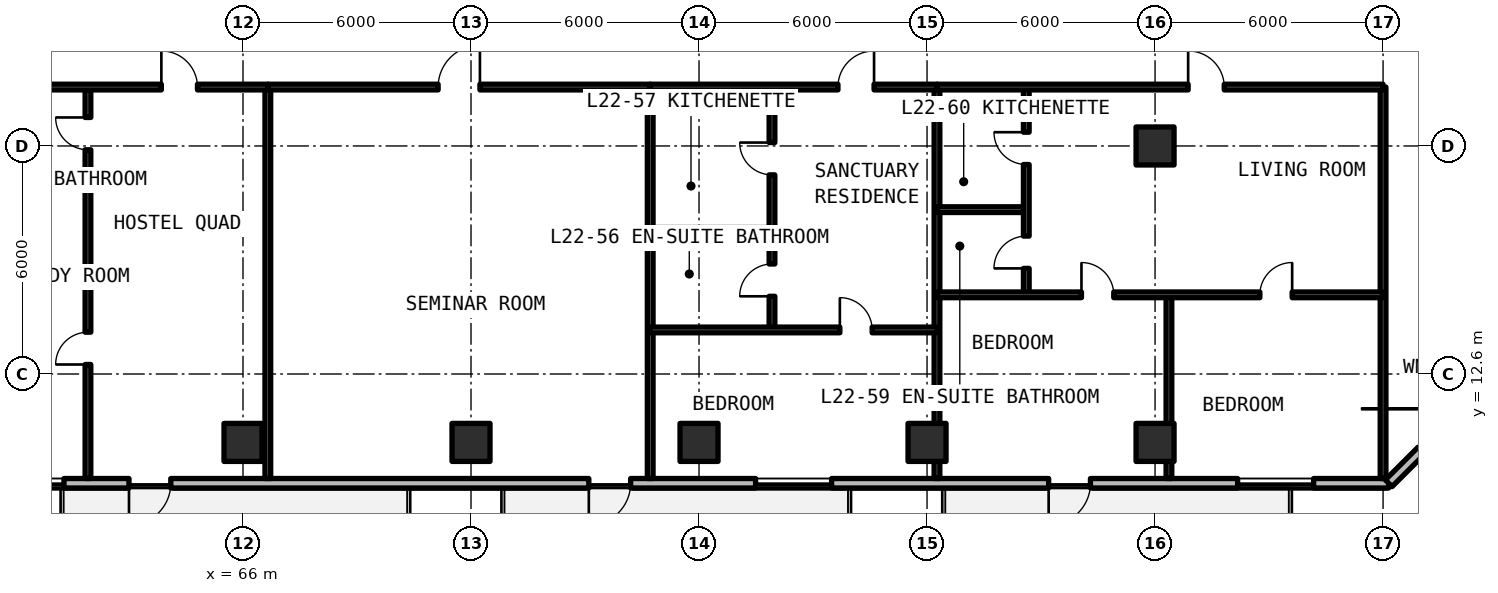
"""IFC4 building model, lengths in metres.
Left out: names, types, materials, properties, quantities, classifications, styles, units other than length and angle.
Written with IfcOpenShell. Run it as: python <this file> out.ifc"""

import sys

from ifc_helpers import new_model, si_unit, direction, frame, frame_2d, origin, origin_2d, place, context, subcontext, project, spatial, rectangle, extrude, element, fill, save


model = new_model("IFC4")
c1 = context("Model", 3, precision=1e-05, world=origin(), true_north=direction((0.0, 1.0)))
c2 = subcontext(c1, "Body", "Model", "MODEL_VIEW")
j1 = project(units=[si_unit("LENGTHUNIT", "METRE"), si_unit("PLANEANGLEUNIT", "RADIAN")], contexts=[c1])
p1 = place(None, origin())
s1 = spatial("IfcSite", under=j1, at=p1, CompositionType="ELEMENT")
p2 = place(p1, origin())
s2 = spatial("IfcBuilding", under=s1, at=p2, CompositionType="ELEMENT")
p3 = place(p2, frame((0.0, 0.0, 82.17)))
s3 = spatial("IfcBuildingStorey", under=s2, at=p3, CompositionType="ELEMENT", Elevation=82.17)
for number, where, z_axis, x_axis in (
    (1, (90.0, 18.6, 0.0), (0.0, 0.0, 1.0), (1.0, 0.0, 0.0)),
    (2, (66.0, 10.8, 0.0), (0.0, 0.0, 1.0), (1.0, 0.0, 0.0)),
    (3, (72.0, 10.8, 0.0), (0.0, 0.0, 1.0), (1.0, 0.0, 0.0)),
    (4, (78.0, 10.8, 0.0), (0.0, 0.0, 1.0), (1.0, 0.0, 0.0)),
    (5, (84.0, 10.8, 0.0), (0.0, 0.0, 1.0), (1.0, 0.0, 0.0)),
    (6, (90.0, 10.8, 0.0), (0.0, 0.0, 1.0), (1.0, 0.0, 0.0)),
):
    element("IfcColumn", number, at=place(p3, frame(where, z_axis=z_axis, x_axis=x_axis)), inside=s3, PredefinedType="COLUMN", context=c2, shape_type="SweptSolid", body=[
        extrude(rectangle(XDim=1.0, YDim=1.0, at=origin_2d()), origin(), (0.0, 0.0, 1.0), 3.3),
    ])
p4 = place(p3, frame((52.125, 9.725, 0.0), z_axis=(0.0, 0.0, 1.0), x_axis=(1.0, 0.0, 0.0)))
e7 = element("IfcWall", 7, at=p4, inside=s3, PredefinedType="SOLIDWALL", context=c2, shape_type="SweptSolid", body=[
    extrude(rectangle(XDim=44.023, YDim=0.25, at=frame_2d((22.012, 0.0))), origin(), (0.0, 0.0, 1.0), 3.08),
])
p5 = place(p4, frame((10.875, 0.0, 0.0)))
e8 = element("IfcOpeningElement", 8, at=p5, cuts=e7, PredefinedType="OPENING", context=c2, shape_type="SweptSolid", body=[
    extrude(rectangle(XDim=1.1, YDim=2.15, at=frame_2d((0.55, 1.075))), frame((0.0, 0.135, 0.0), z_axis=(0.0, -1.0, 0.0), x_axis=(1.0, 0.0, 0.0)), (0.0, 0.0, 1.0), 0.27),
])
p6 = place(p4, frame((22.975, 0.0, 0.0)))
e9 = element("IfcOpeningElement", 9, at=p6, cuts=e7, PredefinedType="OPENING", context=c2, shape_type="SweptSolid", body=[
    extrude(rectangle(XDim=1.1, YDim=2.15, at=frame_2d((0.55, 1.075))), frame((0.0, 0.135, 0.0), z_axis=(0.0, -1.0, 0.0), x_axis=(1.0, 0.0, 0.0)), (0.0, 0.0, 1.0), 0.27),
])
p7 = place(p4, frame((35.075, 0.0, 0.0)))
e10 = element("IfcOpeningElement", 10, at=p7, cuts=e7, PredefinedType="OPENING", context=c2, shape_type="SweptSolid", body=[
    extrude(rectangle(XDim=1.1, YDim=2.15, at=frame_2d((0.55, 1.075))), frame((0.0, 0.135, 0.0), z_axis=(0.0, -1.0, 0.0), x_axis=(1.0, 0.0, 0.0)), (0.0, 0.0, 1.0), 0.27),
])
p8 = place(p4, frame((2.669, 0.0, 0.78)))
e11 = element("IfcOpeningElement", 11, at=p8, cuts=e7, PredefinedType="OPENING", context=c2, shape_type="SweptSolid", body=[
    extrude(rectangle(XDim=2.0, YDim=1.66, at=frame_2d((1.0, 0.83))), frame((0.0, 0.135, 0.0), z_axis=(0.0, -1.0, 0.0), x_axis=(1.0, 0.0, 0.0)), (0.0, 0.0, 1.0), 0.27),
])
p9 = place(p4, frame((8.314, 0.0, 0.78)))
e12 = element("IfcOpeningElement", 12, at=p9, cuts=e7, PredefinedType="OPENING", context=c2, shape_type="SweptSolid", body=[
    extrude(rectangle(XDim=0.85, YDim=1.65, at=frame_2d((0.425, 0.825))), frame((0.0, 0.135, 0.0), z_axis=(0.0, -1.0, 0.0), x_axis=(1.0, 0.0, 0.0)), (0.0, 0.0, 1.0), 0.27),
])
p10 = place(p4, frame((27.363, 0.0, 0.78)))
e13 = element("IfcOpeningElement", 13, at=p10, cuts=e7, PredefinedType="OPENING", context=c2, shape_type="SweptSolid", body=[
    extrude(rectangle(XDim=2.0, YDim=1.66, at=frame_2d((1.0, 0.83))), frame((0.0, 0.135, 0.0), z_axis=(0.0, -1.0, 0.0), x_axis=(1.0, 0.0, 0.0)), (0.0, 0.0, 1.0), 0.27),
])
p11 = place(p4, frame((40.048, 0.0, 0.78)))
e14 = element("IfcOpeningElement", 14, at=p11, cuts=e7, PredefinedType="OPENING", context=c2, shape_type="SweptSolid", body=[
    extrude(rectangle(XDim=2.0, YDim=1.66, at=frame_2d((1.0, 0.83))), frame((0.0, 0.135, 0.0), z_axis=(0.0, -1.0, 0.0), x_axis=(1.0, 0.0, 0.0)), (0.0, 0.0, 1.0), 0.27),
])
p12 = place(p3, frame((96.148, 9.725, 0.0), z_axis=(0.0, 0.0, 1.0), x_axis=(0.707106781187, 0.707106781187, 0.0)))
e15 = element("IfcWall", 15, at=p12, inside=s3, PredefinedType="SOLIDWALL", context=c2, shape_type="SweptSolid", body=[
    extrude(rectangle(XDim=5.836, YDim=0.25, at=frame_2d((2.918, 0.0))), origin(), (0.0, 0.0, 1.0), 3.08),
])
p13 = place(p12, frame((1.218, 0.0, 0.78)))
e16 = element("IfcOpeningElement", 16, at=p13, cuts=e15, PredefinedType="OPENING", context=c2, shape_type="SweptSolid", body=[
    extrude(rectangle(XDim=3.4, YDim=1.66, at=frame_2d((1.7, 0.83))), frame((0.0, 0.135, 0.0), z_axis=(0.0, -1.0, 0.0), x_axis=(1.0, 0.0, 0.0)), (0.0, 0.0, 1.0), 0.27),
])
for number, where, z_axis, x_axis in (
    (17, (96.0, 9.85, 0.0), (0.0, 0.0, 1.0), (0.0, 1.0, 0.0)),
    (18, (66.654, 9.85, 0.0), (0.0, 0.0, 1.0), (0.0, 1.0, 0.0)),
):
    element("IfcWall", number, at=place(p3, frame(where, z_axis=z_axis, x_axis=x_axis)), inside=s3, PredefinedType="SOLIDWALL", context=c2, shape_type="SweptSolid", body=[
        extrude(rectangle(XDim=10.3, YDim=0.15, at=frame_2d((5.15, 0.0))), origin(), (0.0, 0.0, 1.0), 2.35),
    ])
p14 = place(p3, frame((58.828, 17.7, 0.0), z_axis=(0.0, 0.0, 1.0), x_axis=(1.0, 0.0, 0.0)))
e19 = element("IfcWall", 19, at=p14, inside=s3, PredefinedType="PARTITIONING", context=c2, shape_type="SweptSolid", body=[
    extrude(rectangle(XDim=3.092, YDim=0.15, at=frame_2d((1.546, 0.0))), origin(), (0.0, 0.0, 1.0), 2.35),
])
p15 = place(p3, frame((61.92, 9.85, 0.0), z_axis=(0.0, 0.0, 1.0), x_axis=(0.0, 1.0, 0.0)))
e20 = element("IfcWall", 20, at=p15, inside=s3, PredefinedType="PARTITIONING", context=c2, shape_type="SweptSolid", body=[
    extrude(rectangle(XDim=10.3, YDim=0.15, at=frame_2d((5.15, 0.0))), origin(), (0.0, 0.0, 1.0), 2.35),
])
p16 = place(p15, frame((3.0, 0.0, 0.0)))
e21 = element("IfcOpeningElement", 21, at=p16, cuts=e20, PredefinedType="OPENING", context=c2, shape_type="SweptSolid", body=[
    extrude(rectangle(XDim=0.85, YDim=2.1, at=frame_2d((0.425, 1.05))), frame((0.0, 0.085, 0.0), z_axis=(0.0, -1.0, 0.0), x_axis=(1.0, 0.0, 0.0)), (0.0, 0.0, 1.0), 0.17),
])
p17 = place(p15, frame((8.65, 0.0, 0.0)))
e22 = element("IfcOpeningElement", 22, at=p17, cuts=e20, PredefinedType="OPENING", context=c2, shape_type="SweptSolid", body=[
    extrude(rectangle(XDim=0.85, YDim=2.1, at=frame_2d((0.425, 1.05))), frame((0.0, 0.085, 0.0), z_axis=(0.0, -1.0, 0.0), x_axis=(1.0, 0.0, 0.0)), (0.0, 0.0, 1.0), 0.17),
])
p18 = place(p3, frame((58.828, 20.15, 0.0), z_axis=(0.0, 0.0, 1.0), x_axis=(1.0, 0.0, 0.0)))
e23 = element("IfcWall", 23, at=p18, inside=s3, PredefinedType="SOLIDWALL", context=c2, shape_type="SweptSolid", body=[
    extrude(rectangle(XDim=7.826, YDim=0.15, at=frame_2d((3.913, 0.0))), origin(), (0.0, 0.0, 1.0), 2.35),
])
p19 = place(p18, frame((5.024, 0.0, 0.0)))
e24 = element("IfcOpeningElement", 24, at=p19, cuts=e23, PredefinedType="OPENING", context=c2, shape_type="SweptSolid", body=[
    extrude(rectangle(XDim=0.95, YDim=2.15, at=frame_2d((0.475, 1.075))), frame((0.0, 0.085, 0.0), z_axis=(0.0, -1.0, 0.0), x_axis=(1.0, 0.0, 0.0)), (0.0, 0.0, 1.0), 0.17),
])
p20 = place(p3, frame((76.715, 9.85, 0.0), z_axis=(0.0, 0.0, 1.0), x_axis=(0.0, 1.0, 0.0)))
e25 = element("IfcWall", 25, at=p20, inside=s3, PredefinedType="SOLIDWALL", context=c2, shape_type="SweptSolid", body=[
    extrude(rectangle(XDim=10.3, YDim=0.15, at=frame_2d((5.15, 0.0))), origin(), (0.0, 0.0, 1.0), 2.35),
])
p21 = place(p3, frame((66.654, 20.15, 0.0), z_axis=(0.0, 0.0, 1.0), x_axis=(1.0, 0.0, 0.0)))
e26 = element("IfcWall", 26, at=p21, inside=s3, PredefinedType="SOLIDWALL", context=c2, shape_type="SweptSolid", body=[
    extrude(rectangle(XDim=10.062, YDim=0.15, at=frame_2d((5.031, 0.0))), origin(), (0.0, 0.0, 1.0), 2.35),
])
p22 = place(p21, frame((4.481, 0.0, 0.0)))
e27 = element("IfcOpeningElement", 27, at=p22, cuts=e26, PredefinedType="OPENING", context=c2, shape_type="SweptSolid", body=[
    extrude(rectangle(XDim=1.1, YDim=2.15, at=frame_2d((0.55, 1.075))), frame((0.0, 0.085, 0.0), z_axis=(0.0, -1.0, 0.0), x_axis=(1.0, 0.0, 0.0)), (0.0, 0.0, 1.0), 0.17),
])
p23 = place(p3, frame((84.261, 9.85, 0.0), z_axis=(0.0, 0.0, 1.0), x_axis=(0.0, 1.0, 0.0)))
e28 = element("IfcWall", 28, at=p23, inside=s3, PredefinedType="SOLIDWALL", context=c2, shape_type="SweptSolid", body=[
    extrude(rectangle(XDim=10.3, YDim=0.15, at=frame_2d((5.15, 0.0))), origin(), (0.0, 0.0, 1.0), 2.35),
])
p24 = place(p3, frame((76.715, 16.379, 0.0), z_axis=(0.0, 0.0, 1.0), x_axis=(1.0, 0.0, 0.0)))
e29 = element("IfcWall", 29, at=p24, inside=s3, PredefinedType="PARTITIONING", context=c2, shape_type="SweptSolid", body=[
    extrude(rectangle(XDim=3.205, YDim=0.15, at=frame_2d((1.603, 0.0))), origin(), (0.0, 0.0, 1.0), 2.35),
])
p25 = place(p3, frame((79.92, 13.759, 0.0), z_axis=(0.0, 0.0, 1.0), x_axis=(0.0, 1.0, 0.0)))
e30 = element("IfcWall", 30, at=p25, inside=s3, PredefinedType="PARTITIONING", context=c2, shape_type="SweptSolid", body=[
    extrude(rectangle(XDim=6.391, YDim=0.15, at=frame_2d((3.195, 0.0))), origin(), (0.0, 0.0, 1.0), 2.35),
])
p26 = place(p25, frame((0.885, 0.0, 0.0)))
e31 = element("IfcOpeningElement", 31, at=p26, cuts=e30, PredefinedType="OPENING", context=c2, shape_type="SweptSolid", body=[
    extrude(rectangle(XDim=0.85, YDim=2.1, at=frame_2d((0.425, 1.05))), frame((0.0, 0.085, 0.0), z_axis=(0.0, -1.0, 0.0), x_axis=(1.0, 0.0, 0.0)), (0.0, 0.0, 1.0), 0.17),
])
p27 = place(p25, frame((4.08, 0.0, 0.0)))
e32 = element("IfcOpeningElement", 32, at=p27, cuts=e30, PredefinedType="OPENING", context=c2, shape_type="SweptSolid", body=[
    extrude(rectangle(XDim=0.85, YDim=2.1, at=frame_2d((0.425, 1.05))), frame((0.0, 0.085, 0.0), z_axis=(0.0, -1.0, 0.0), x_axis=(1.0, 0.0, 0.0)), (0.0, 0.0, 1.0), 0.17),
])
p28 = place(p3, frame((76.715, 13.759, 0.0), z_axis=(0.0, 0.0, 1.0), x_axis=(1.0, 0.0, 0.0)))
e33 = element("IfcWall", 33, at=p28, inside=s3, PredefinedType="PARTITIONING", context=c2, shape_type="SweptSolid", body=[
    extrude(rectangle(XDim=7.546, YDim=0.15, at=frame_2d((3.773, 0.0))), origin(), (0.0, 0.0, 1.0), 2.35),
])
p29 = place(p28, frame((4.99, 0.0, 0.0)))
e34 = element("IfcOpeningElement", 34, at=p29, cuts=e33, PredefinedType="OPENING", context=c2, shape_type="SweptSolid", body=[
    extrude(rectangle(XDim=0.85, YDim=2.1, at=frame_2d((0.425, 1.05))), frame((0.0, 0.085, 0.0), z_axis=(0.0, -1.0, 0.0), x_axis=(1.0, 0.0, 0.0)), (0.0, 0.0, 1.0), 0.17),
])
p30 = place(p3, frame((76.715, 20.15, 0.0), z_axis=(0.0, 0.0, 1.0), x_axis=(1.0, 0.0, 0.0)))
e35 = element("IfcWall", 35, at=p30, inside=s3, PredefinedType="SOLIDWALL", context=c2, shape_type="SweptSolid", body=[
    extrude(rectangle(XDim=7.546, YDim=0.15, at=frame_2d((3.773, 0.0))), origin(), (0.0, 0.0, 1.0), 2.35),
])
p31 = place(p30, frame((4.94, 0.0, 0.0)))
e36 = element("IfcOpeningElement", 36, at=p31, cuts=e35, PredefinedType="OPENING", context=c2, shape_type="SweptSolid", body=[
    extrude(rectangle(XDim=0.95, YDim=2.15, at=frame_2d((0.475, 1.075))), frame((0.0, 0.085, 0.0), z_axis=(0.0, -1.0, 0.0), x_axis=(1.0, 0.0, 0.0)), (0.0, 0.0, 1.0), 0.17),
])
p32 = place(p3, frame((84.261, 16.924, 0.0), z_axis=(0.0, 0.0, 1.0), x_axis=(1.0, 0.0, 0.0)))
e37 = element("IfcWall", 37, at=p32, inside=s3, PredefinedType="PARTITIONING", context=c2, shape_type="SweptSolid", body=[
    extrude(rectangle(XDim=2.35, YDim=0.15, at=frame_2d((1.175, 0.0))), origin(), (0.0, 0.0, 1.0), 2.35),
])
p33 = place(p3, frame((86.611, 14.683, 0.0), z_axis=(0.0, 0.0, 1.0), x_axis=(0.0, 1.0, 0.0)))
e38 = element("IfcWall", 38, at=p33, inside=s3, PredefinedType="PARTITIONING", context=c2, shape_type="SweptSolid", body=[
    extrude(rectangle(XDim=5.467, YDim=0.15, at=frame_2d((2.733, 0.0))), origin(), (0.0, 0.0, 1.0), 2.35),
])
p34 = place(p33, frame((0.696, 0.0, 0.0)))
e39 = element("IfcOpeningElement", 39, at=p34, cuts=e38, PredefinedType="OPENING", context=c2, shape_type="SweptSolid", body=[
    extrude(rectangle(XDim=0.85, YDim=2.1, at=frame_2d((0.425, 1.05))), frame((0.0, 0.085, 0.0), z_axis=(0.0, -1.0, 0.0), x_axis=(1.0, 0.0, 0.0)), (0.0, 0.0, 1.0), 0.17),
])
p35 = place(p33, frame((3.429, 0.0, 0.0)))
e40 = element("IfcOpeningElement", 40, at=p35, cuts=e38, PredefinedType="OPENING", context=c2, shape_type="SweptSolid", body=[
    extrude(rectangle(XDim=0.85, YDim=2.1, at=frame_2d((0.425, 1.05))), frame((0.0, 0.085, 0.0), z_axis=(0.0, -1.0, 0.0), x_axis=(1.0, 0.0, 0.0)), (0.0, 0.0, 1.0), 0.17),
])
p36 = place(p3, frame((90.365, 9.85, 0.0), z_axis=(0.0, 0.0, 1.0), x_axis=(0.0, 1.0, 0.0)))
e41 = element("IfcWall", 41, at=p36, inside=s3, PredefinedType="PARTITIONING", context=c2, shape_type="SweptSolid", body=[
    extrude(rectangle(XDim=4.833, YDim=0.15, at=frame_2d((2.417, 0.0))), origin(), (0.0, 0.0, 1.0), 2.35),
])
p37 = place(p3, frame((84.261, 14.683, 0.0), z_axis=(0.0, 0.0, 1.0), x_axis=(1.0, 0.0, 0.0)))
e42 = element("IfcWall", 42, at=p37, inside=s3, PredefinedType="PARTITIONING", context=c2, shape_type="SweptSolid", body=[
    extrude(rectangle(XDim=11.739, YDim=0.15, at=frame_2d((5.869, 0.0))), origin(), (0.0, 0.0, 1.0), 2.35),
])
p38 = place(p37, frame((3.802, 0.0, 0.0)))
e43 = element("IfcOpeningElement", 43, at=p38, cuts=e42, PredefinedType="OPENING", context=c2, shape_type="SweptSolid", body=[
    extrude(rectangle(XDim=0.85, YDim=2.1, at=frame_2d((0.425, 1.05))), frame((0.0, 0.085, 0.0), z_axis=(0.0, -1.0, 0.0), x_axis=(1.0, 0.0, 0.0)), (0.0, 0.0, 1.0), 0.17),
])
p39 = place(p37, frame((8.496, 0.0, 0.0)))
e44 = element("IfcOpeningElement", 44, at=p39, cuts=e42, PredefinedType="OPENING", context=c2, shape_type="SweptSolid", body=[
    extrude(rectangle(XDim=0.85, YDim=2.1, at=frame_2d((0.425, 1.05))), frame((0.0, 0.085, 0.0), z_axis=(0.0, -1.0, 0.0), x_axis=(1.0, 0.0, 0.0)), (0.0, 0.0, 1.0), 0.17),
])
p40 = place(p3, frame((84.261, 20.15, 0.0), z_axis=(0.0, 0.0, 1.0), x_axis=(1.0, 0.0, 0.0)))
e45 = element("IfcWall", 45, at=p40, inside=s3, PredefinedType="SOLIDWALL", context=c2, shape_type="SweptSolid", body=[
    extrude(rectangle(XDim=11.739, YDim=0.15, at=frame_2d((5.869, 0.0))), origin(), (0.0, 0.0, 1.0), 2.35),
])
p41 = place(p40, frame((6.609, 0.0, 0.0)))
e46 = element("IfcOpeningElement", 46, at=p41, cuts=e45, PredefinedType="OPENING", context=c2, shape_type="SweptSolid", body=[
    extrude(rectangle(XDim=0.95, YDim=2.15, at=frame_2d((0.475, 1.075))), frame((0.0, 0.085, 0.0), z_axis=(0.0, -1.0, 0.0), x_axis=(1.0, 0.0, 0.0)), (0.0, 0.0, 1.0), 0.17),
])
p42 = place(p5, frame((1.1, 0.0, 0.0), z_axis=(0.0, 0.0, 1.0), x_axis=(-1.0, 0.0, 0.0)))
e47 = element("IfcDoor", 47, at=p42, inside=s3, OperationType="SINGLE_SWING_LEFT", PredefinedType="DOOR", context=c2, shape_type="SweptSolid", body=[
    extrude(rectangle(XDim=1.1, YDim=2.15, at=frame_2d((0.55, 1.075))), frame((0.0, 0.025, 0.0), z_axis=(0.0, -1.0, 0.0), x_axis=(1.0, 0.0, 0.0)), (0.0, 0.0, 1.0), 0.05),
])
fill(e8, e47)
p43 = place(p6, frame((1.1, 0.0, 0.0), z_axis=(0.0, 0.0, 1.0), x_axis=(-1.0, 0.0, 0.0)))
e48 = element("IfcDoor", 48, at=p43, inside=s3, OperationType="SINGLE_SWING_RIGHT", PredefinedType="DOOR", context=c2, shape_type="SweptSolid", body=[
    extrude(rectangle(XDim=1.1, YDim=2.15, at=frame_2d((0.55, 1.075))), frame((0.0, 0.025, 0.0), z_axis=(0.0, -1.0, 0.0), x_axis=(1.0, 0.0, 0.0)), (0.0, 0.0, 1.0), 0.05),
])
fill(e9, e48)
p44 = place(p7, frame((1.1, 0.0, 0.0), z_axis=(0.0, 0.0, 1.0), x_axis=(-1.0, 0.0, 0.0)))
e49 = element("IfcDoor", 49, at=p44, inside=s3, OperationType="SINGLE_SWING_LEFT", PredefinedType="DOOR", context=c2, shape_type="SweptSolid", body=[
    extrude(rectangle(XDim=1.1, YDim=2.15, at=frame_2d((0.55, 1.075))), frame((0.0, 0.025, 0.0), z_axis=(0.0, -1.0, 0.0), x_axis=(1.0, 0.0, 0.0)), (0.0, 0.0, 1.0), 0.05),
])
fill(e10, e49)
p45 = place(p9, origin())
e50 = element("IfcWindow", 50, at=p45, inside=s3, PartitioningType="SINGLE_PANEL", PredefinedType="WINDOW", context=c2, shape_type="SweptSolid", body=[
    extrude(rectangle(XDim=0.85, YDim=1.65, at=frame_2d((0.425, 0.825))), frame((0.0, 0.03, 0.0), z_axis=(0.0, -1.0, 0.0), x_axis=(1.0, 0.0, 0.0)), (0.0, 0.0, 1.0), 0.06),
])
fill(e12, e50)
p46 = place(p10, origin())
e51 = element("IfcWindow", 51, at=p46, inside=s3, PartitioningType="SINGLE_PANEL", PredefinedType="WINDOW", context=c2, shape_type="SweptSolid", body=[
    extrude(rectangle(XDim=2.0, YDim=1.66, at=frame_2d((1.0, 0.83))), frame((0.0, 0.03, 0.0), z_axis=(0.0, -1.0, 0.0), x_axis=(1.0, 0.0, 0.0)), (0.0, 0.0, 1.0), 0.06),
])
fill(e13, e51)
p47 = place(p11, origin())
e52 = element("IfcWindow", 52, at=p47, inside=s3, PartitioningType="SINGLE_PANEL", PredefinedType="WINDOW", context=c2, shape_type="SweptSolid", body=[
    extrude(rectangle(XDim=2.0, YDim=1.66, at=frame_2d((1.0, 0.83))), frame((0.0, 0.03, 0.0), z_axis=(0.0, -1.0, 0.0), x_axis=(1.0, 0.0, 0.0)), (0.0, 0.0, 1.0), 0.06),
])
fill(e14, e52)
p48 = place(p16, origin())
e53 = element("IfcDoor", 53, at=p48, inside=s3, OperationType="SINGLE_SWING_LEFT", PredefinedType="DOOR", context=c2, shape_type="SweptSolid", body=[
    extrude(rectangle(XDim=0.85, YDim=2.1, at=frame_2d((0.425, 1.05))), frame((0.0, 0.025, 0.0), z_axis=(0.0, -1.0, 0.0), x_axis=(1.0, 0.0, 0.0)), (0.0, 0.0, 1.0), 0.05),
])
fill(e21, e53)
p49 = place(p17, origin())
e54 = element("IfcDoor", 54, at=p49, inside=s3, OperationType="SINGLE_SWING_RIGHT", PredefinedType="DOOR", context=c2, shape_type="SweptSolid", body=[
    extrude(rectangle(XDim=0.85, YDim=2.1, at=frame_2d((0.425, 1.05))), frame((0.0, 0.025, 0.0), z_axis=(0.0, -1.0, 0.0), x_axis=(1.0, 0.0, 0.0)), (0.0, 0.0, 1.0), 0.05),
])
fill(e22, e54)
p50 = place(p19, origin())
e55 = element("IfcDoor", 55, at=p50, inside=s3, OperationType="SINGLE_SWING_LEFT", PredefinedType="DOOR", context=c2, shape_type="SweptSolid", body=[
    extrude(rectangle(XDim=0.95, YDim=2.15, at=frame_2d((0.475, 1.075))), frame((0.0, 0.025, 0.0), z_axis=(0.0, -1.0, 0.0), x_axis=(1.0, 0.0, 0.0)), (0.0, 0.0, 1.0), 0.05),
])
fill(e24, e55)
p51 = place(p22, origin())
e56 = element("IfcDoor", 56, at=p51, inside=s3, OperationType="SINGLE_SWING_RIGHT", PredefinedType="DOOR", context=c2, shape_type="SweptSolid", body=[
    extrude(rectangle(XDim=1.1, YDim=2.15, at=frame_2d((0.55, 1.075))), frame((0.0, 0.025, 0.0), z_axis=(0.0, -1.0, 0.0), x_axis=(1.0, 0.0, 0.0)), (0.0, 0.0, 1.0), 0.05),
])
fill(e27, e56)
p52 = place(p26, origin())
e57 = element("IfcDoor", 57, at=p52, inside=s3, OperationType="SINGLE_SWING_LEFT", PredefinedType="DOOR", context=c2, shape_type="SweptSolid", body=[
    extrude(rectangle(XDim=0.85, YDim=2.1, at=frame_2d((0.425, 1.05))), frame((0.0, 0.025, 0.0), z_axis=(0.0, -1.0, 0.0), x_axis=(1.0, 0.0, 0.0)), (0.0, 0.0, 1.0), 0.05),
])
fill(e31, e57)
p53 = place(p27, origin())
e58 = element("IfcDoor", 58, at=p53, inside=s3, OperationType="SINGLE_SWING_RIGHT", PredefinedType="DOOR", context=c2, shape_type="SweptSolid", body=[
    extrude(rectangle(XDim=0.85, YDim=2.1, at=frame_2d((0.425, 1.05))), frame((0.0, 0.025, 0.0), z_axis=(0.0, -1.0, 0.0), x_axis=(1.0, 0.0, 0.0)), (0.0, 0.0, 1.0), 0.05),
])
fill(e32, e58)
p54 = place(p29, origin())
e59 = element("IfcDoor", 59, at=p54, inside=s3, OperationType="SINGLE_SWING_LEFT", PredefinedType="DOOR", context=c2, shape_type="SweptSolid", body=[
    extrude(rectangle(XDim=0.85, YDim=2.1, at=frame_2d((0.425, 1.05))), frame((0.0, 0.025, 0.0), z_axis=(0.0, -1.0, 0.0), x_axis=(1.0, 0.0, 0.0)), (0.0, 0.0, 1.0), 0.05),
])
fill(e34, e59)
p55 = place(p31, origin())
e60 = element("IfcDoor", 60, at=p55, inside=s3, OperationType="SINGLE_SWING_RIGHT", PredefinedType="DOOR", context=c2, shape_type="SweptSolid", body=[
    extrude(rectangle(XDim=0.95, YDim=2.15, at=frame_2d((0.475, 1.075))), frame((0.0, 0.025, 0.0), z_axis=(0.0, -1.0, 0.0), x_axis=(1.0, 0.0, 0.0)), (0.0, 0.0, 1.0), 0.05),
])
fill(e36, e60)
p56 = place(p34, origin())
e61 = element("IfcDoor", 61, at=p56, inside=s3, OperationType="SINGLE_SWING_LEFT", PredefinedType="DOOR", context=c2, shape_type="SweptSolid", body=[
    extrude(rectangle(XDim=0.85, YDim=2.1, at=frame_2d((0.425, 1.05))), frame((0.0, 0.025, 0.0), z_axis=(0.0, -1.0, 0.0), x_axis=(1.0, 0.0, 0.0)), (0.0, 0.0, 1.0), 0.05),
])
fill(e39, e61)
p57 = place(p35, origin())
e62 = element("IfcDoor", 62, at=p57, inside=s3, OperationType="SINGLE_SWING_RIGHT", PredefinedType="DOOR", context=c2, shape_type="SweptSolid", body=[
    extrude(rectangle(XDim=0.85, YDim=2.1, at=frame_2d((0.425, 1.05))), frame((0.0, 0.025, 0.0), z_axis=(0.0, -1.0, 0.0), x_axis=(1.0, 0.0, 0.0)), (0.0, 0.0, 1.0), 0.05),
])
fill(e40, e62)
p58 = place(p38, origin())
e63 = element("IfcDoor", 63, at=p58, inside=s3, OperationType="SINGLE_SWING_LEFT", PredefinedType="DOOR", context=c2, shape_type="SweptSolid", body=[
    extrude(rectangle(XDim=0.85, YDim=2.1, at=frame_2d((0.425, 1.05))), frame((0.0, 0.025, 0.0), z_axis=(0.0, -1.0, 0.0), x_axis=(1.0, 0.0, 0.0)), (0.0, 0.0, 1.0), 0.05),
])
fill(e43, e63)
p59 = place(p39, origin())
e64 = element("IfcDoor", 64, at=p59, inside=s3, OperationType="SINGLE_SWING_RIGHT", PredefinedType="DOOR", context=c2, shape_type="SweptSolid", body=[
    extrude(rectangle(XDim=0.85, YDim=2.1, at=frame_2d((0.425, 1.05))), frame((0.0, 0.025, 0.0), z_axis=(0.0, -1.0, 0.0), x_axis=(1.0, 0.0, 0.0)), (0.0, 0.0, 1.0), 0.05),
])
fill(e44, e64)
p60 = place(p41, origin())
e65 = element("IfcDoor", 65, at=p60, inside=s3, OperationType="SINGLE_SWING_LEFT", PredefinedType="DOOR", context=c2, shape_type="SweptSolid", body=[
    extrude(rectangle(XDim=0.95, YDim=2.15, at=frame_2d((0.475, 1.075))), frame((0.0, 0.025, 0.0), z_axis=(0.0, -1.0, 0.0), x_axis=(1.0, 0.0, 0.0)), (0.0, 0.0, 1.0), 0.05),
])
fill(e46, e65)
save(model, sys.argv[1])
